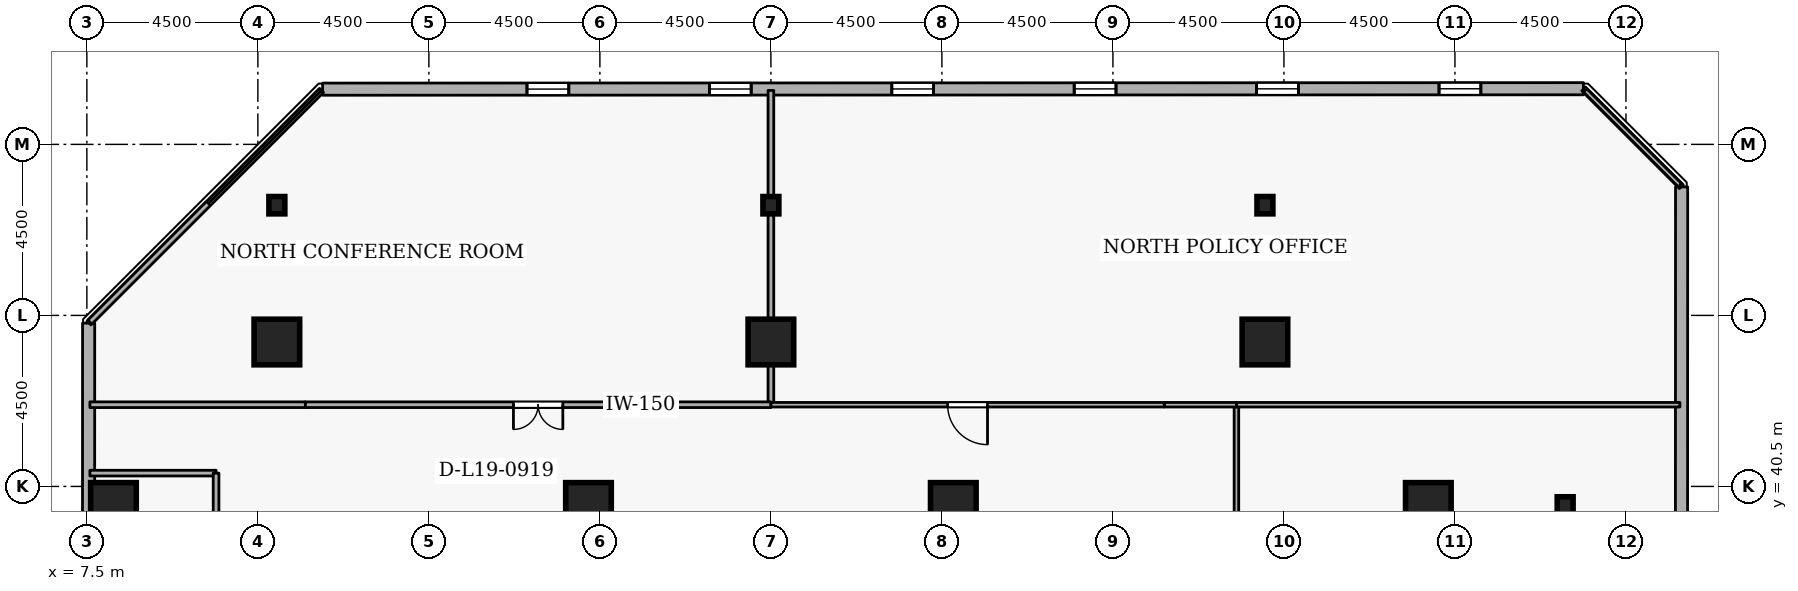
"""IFC4 building model, lengths in metres.
Left out: names, types, materials, properties, quantities, classifications, styles, units other than length and angle.
Written with IfcOpenShell. Run it as: python <this file> out.ifc"""

import sys

from ifc_helpers import new_model, si_unit, direction, frame, frame_2d, origin, origin_2d, place, context, subcontext, project, spatial, rectangle, i_section, extrude, element, fill, save


model = new_model("IFC4")
c1 = context("Model", 3, precision=1e-05, world=origin(), true_north=direction((0.0, 1.0)))
c2 = subcontext(c1, "Body", "Model", "MODEL_VIEW")
j1 = project(units=[si_unit("LENGTHUNIT", "METRE"), si_unit("PLANEANGLEUNIT", "RADIAN")], contexts=[c1])
p1 = place(None, origin())
s1 = spatial("IfcSite", under=j1, at=p1, CompositionType="ELEMENT")
p2 = place(p1, origin())
s2 = spatial("IfcBuilding", under=s1, at=p2, CompositionType="ELEMENT")
p3 = place(p2, frame((0.0, 0.0, 75.9)))
s3 = spatial("IfcBuildingStorey", under=s2, at=p3, CompositionType="ELEMENT", Elevation=75.9)
for number, where, z_axis, x_axis in (
    (1, (42.8, 40.0, 0.0), (0.0, 0.0, 1.0), (1.0, 0.0, 0.0)),
    (2, (12.5, 44.3, 0.0), (0.0, 0.0, 1.0), (1.0, 0.0, 0.0)),
    (3, (25.5, 44.3, 0.0), (0.0, 0.0, 1.0), (1.0, 0.0, 0.0)),
    (4, (38.5, 44.3, 0.0), (0.0, 0.0, 1.0), (1.0, 0.0, 0.0)),
    (5, (8.2, 40.0, 0.0), (0.0, 0.0, 1.0), (1.0, 0.0, 0.0)),
    (6, (20.7, 40.0, 0.0), (0.0, 0.0, 1.0), (1.0, 0.0, 0.0)),
    (7, (30.3, 40.0, 0.0), (0.0, 0.0, 1.0), (1.0, 0.0, 0.0)),
):
    element("IfcColumn", number, at=place(p3, frame(where, z_axis=z_axis, x_axis=x_axis)), inside=s3, PredefinedType="COLUMN", context=c2, shape_type="SweptSolid", body=[
        extrude(rectangle(XDim=1.2, YDim=1.2, at=origin_2d()), origin(), (0.0, 0.0, 1.0), 4.2),
    ])
for number, where, z_axis, x_axis in (
    (8, (46.4, 40.0, 0.0), (0.0, 0.0, 1.0), (1.0, 0.0, 0.0)),
    (9, (12.5, 47.9, 0.0), (0.0, 0.0, 1.0), (1.0, 0.0, 0.0)),
    (10, (25.5, 47.9, 0.0), (0.0, 0.0, 1.0), (1.0, 0.0, 0.0)),
    (11, (38.5, 47.9, 0.0), (0.0, 0.0, 1.0), (1.0, 0.0, 0.0)),
):
    element("IfcColumn", number, at=place(p3, frame(where, z_axis=z_axis, x_axis=x_axis)), inside=s3, PredefinedType="COLUMN", context=c2, shape_type="SweptSolid", body=[
        extrude(i_section(OverallWidth=0.418, OverallDepth=0.456, WebThickness=0.042, FlangeThickness=0.067, FilletRadius=0.015, at=origin_2d()), origin(), (0.0, 0.0, 1.0), 4.2),
    ])
p4 = place(p3, frame((49.453, 15.204, 0.0), z_axis=(0.0, 0.0, 1.0), x_axis=(0.000353213856, 0.99999993762, 0.0)))
e12 = element("IfcWall", 12, at=p4, inside=s3, PredefinedType="STANDARD", context=c2, shape_type="SweptSolid", body=[
    extrude(rectangle(XDim=33.177, YDim=0.32, at=frame_2d((16.589, 0.0))), origin(), (0.0, 0.0, 1.0), 3.3),
])
p5 = place(p4, frame((2.7, 0.0, 0.72)))
e13 = element("IfcOpeningElement", 13, at=p5, cuts=e12, PredefinedType="OPENING", context=c2, shape_type="SweptSolid", body=[
    extrude(rectangle(XDim=1.1, YDim=1.8, at=frame_2d((0.55, 0.9))), frame((0.0, 0.17, 0.0), z_axis=(0.0, -1.0, 0.0), x_axis=(1.0, 0.0, 0.0)), (0.0, 0.0, 1.0), 0.34),
])
p6 = place(p4, frame((7.5, 0.0, 0.72)))
e14 = element("IfcOpeningElement", 14, at=p6, cuts=e12, PredefinedType="OPENING", context=c2, shape_type="SweptSolid", body=[
    extrude(rectangle(XDim=1.1, YDim=1.8, at=frame_2d((0.55, 0.9))), frame((0.0, 0.17, 0.0), z_axis=(0.0, -1.0, 0.0), x_axis=(1.0, 0.0, 0.0)), (0.0, 0.0, 1.0), 0.34),
])
p7 = place(p4, frame((12.3, 0.0, 0.72)))
e15 = element("IfcOpeningElement", 15, at=p7, cuts=e12, PredefinedType="OPENING", context=c2, shape_type="SweptSolid", body=[
    extrude(rectangle(XDim=1.1, YDim=1.8, at=frame_2d((0.55, 0.9))), frame((0.0, 0.17, 0.0), z_axis=(0.0, -1.0, 0.0), x_axis=(1.0, 0.0, 0.0)), (0.0, 0.0, 1.0), 0.34),
])
p8 = place(p4, frame((17.1, 0.0, 0.72)))
e16 = element("IfcOpeningElement", 16, at=p8, cuts=e12, PredefinedType="OPENING", context=c2, shape_type="SweptSolid", body=[
    extrude(rectangle(XDim=1.1, YDim=1.8, at=frame_2d((0.55, 0.9))), frame((0.0, 0.17, 0.0), z_axis=(0.0, -1.0, 0.0), x_axis=(1.0, 0.0, 0.0)), (0.0, 0.0, 1.0), 0.34),
])
p9 = place(p4, frame((21.9, 0.0, 0.72)))
e17 = element("IfcOpeningElement", 17, at=p9, cuts=e12, PredefinedType="OPENING", context=c2, shape_type="SweptSolid", body=[
    extrude(rectangle(XDim=1.1, YDim=1.8, at=frame_2d((0.55, 0.9))), frame((0.0, 0.17, 0.0), z_axis=(0.0, -1.0, 0.0), x_axis=(1.0, 0.0, 0.0)), (0.0, 0.0, 1.0), 0.34),
])
p10 = place(p3, frame((46.881, 50.965, 0.0), z_axis=(0.0, 0.0, 1.0), x_axis=(-0.99999993762, -0.000353213856, 0.0)))
e18 = element("IfcWall", 18, at=p10, inside=s3, PredefinedType="STANDARD", context=c2, shape_type="SweptSolid", body=[
    extrude(rectangle(XDim=33.177, YDim=0.32, at=frame_2d((16.589, 0.0))), origin(), (0.0, 0.0, 1.0), 3.3),
])
p11 = place(p10, frame((2.7, 0.0, 0.72)))
e19 = element("IfcOpeningElement", 19, at=p11, cuts=e18, PredefinedType="OPENING", context=c2, shape_type="SweptSolid", body=[
    extrude(rectangle(XDim=1.1, YDim=1.8, at=frame_2d((0.55, 0.9))), frame((0.0, 0.17, 0.0), z_axis=(0.0, -1.0, 0.0), x_axis=(1.0, 0.0, 0.0)), (0.0, 0.0, 1.0), 0.34),
])
p12 = place(p10, frame((7.5, 0.0, 0.72)))
e20 = element("IfcOpeningElement", 20, at=p12, cuts=e18, PredefinedType="OPENING", context=c2, shape_type="SweptSolid", body=[
    extrude(rectangle(XDim=1.1, YDim=1.8, at=frame_2d((0.55, 0.9))), frame((0.0, 0.17, 0.0), z_axis=(0.0, -1.0, 0.0), x_axis=(1.0, 0.0, 0.0)), (0.0, 0.0, 1.0), 0.34),
])
p13 = place(p10, frame((12.3, 0.0, 0.72)))
e21 = element("IfcOpeningElement", 21, at=p13, cuts=e18, PredefinedType="OPENING", context=c2, shape_type="SweptSolid", body=[
    extrude(rectangle(XDim=1.1, YDim=1.8, at=frame_2d((0.55, 0.9))), frame((0.0, 0.17, 0.0), z_axis=(0.0, -1.0, 0.0), x_axis=(1.0, 0.0, 0.0)), (0.0, 0.0, 1.0), 0.34),
])
p14 = place(p10, frame((17.1, 0.0, 0.72)))
e22 = element("IfcOpeningElement", 22, at=p14, cuts=e18, PredefinedType="OPENING", context=c2, shape_type="SweptSolid", body=[
    extrude(rectangle(XDim=1.1, YDim=1.8, at=frame_2d((0.55, 0.9))), frame((0.0, 0.17, 0.0), z_axis=(0.0, -1.0, 0.0), x_axis=(1.0, 0.0, 0.0)), (0.0, 0.0, 1.0), 0.34),
])
p15 = place(p10, frame((21.9, 0.0, 0.72)))
e23 = element("IfcOpeningElement", 23, at=p15, cuts=e18, PredefinedType="OPENING", context=c2, shape_type="SweptSolid", body=[
    extrude(rectangle(XDim=1.1, YDim=1.8, at=frame_2d((0.55, 0.9))), frame((0.0, 0.17, 0.0), z_axis=(0.0, -1.0, 0.0), x_axis=(1.0, 0.0, 0.0)), (0.0, 0.0, 1.0), 0.34),
])
p16 = place(p10, frame((26.7, 0.0, 0.72)))
e24 = element("IfcOpeningElement", 24, at=p16, cuts=e18, PredefinedType="OPENING", context=c2, shape_type="SweptSolid", body=[
    extrude(rectangle(XDim=1.1, YDim=1.8, at=frame_2d((0.55, 0.9))), frame((0.0, 0.17, 0.0), z_axis=(0.0, -1.0, 0.0), x_axis=(1.0, 0.0, 0.0)), (0.0, 0.0, 1.0), 0.34),
])
p17 = place(p3, frame((7.547, 44.796, 0.0), z_axis=(0.0, 0.0, 1.0), x_axis=(-0.000353213856, -0.99999993762, 0.0)))
e25 = element("IfcWall", 25, at=p17, inside=s3, PredefinedType="STANDARD", context=c2, shape_type="SweptSolid", body=[
    extrude(rectangle(XDim=33.177, YDim=0.32, at=frame_2d((16.589, 0.0))), origin(), (0.0, 0.0, 1.0), 3.3),
])
p18 = place(p3, frame((7.58, 40.85, 0.0), z_axis=(0.0, 0.0, 1.0), x_axis=(1.0, 0.0, 0.0)))
e26 = element("IfcWall", 26, at=p18, inside=s3, PredefinedType="PARTITIONING", context=c2, shape_type="SweptSolid", body=[
    extrude(rectangle(XDim=3.32, YDim=0.15, at=frame_2d((1.66, 0.0))), origin(), (0.0, 0.0, 1.0), 3.94),
])
p19 = place(p3, frame((10.9, 40.85, 0.0), z_axis=(0.0, 0.0, 1.0), x_axis=(0.0, -1.0, 0.0)))
e27 = element("IfcWall", 27, at=p19, inside=s3, PredefinedType="PARTITIONING", context=c2, shape_type="SweptSolid", body=[
    extrude(rectangle(XDim=4.912, YDim=0.15, at=frame_2d((2.456, 0.0))), origin(), (0.0, 0.0, 1.0), 3.94),
])
p20 = place(p3, frame((37.75, 33.3, 0.0), z_axis=(0.0, 0.0, 1.0), x_axis=(0.0, 1.0, 0.0)))
e28 = element("IfcWall", 28, at=p20, inside=s3, PredefinedType="PARTITIONING", context=c2, shape_type="SweptSolid", body=[
    extrude(rectangle(XDim=9.35, YDim=0.12, at=frame_2d((4.675, 0.0))), origin(), (0.0, 0.0, 1.0), 3.94),
])
p21 = place(p20, frame((4.15, 0.0, 0.0)))
e29 = element("IfcOpeningElement", 29, at=p21, cuts=e28, PredefinedType="OPENING", context=c2, shape_type="SweptSolid", body=[
    extrude(rectangle(XDim=1.05, YDim=2.1, at=frame_2d((0.525, 1.05))), frame((0.0, 0.07, 0.0), z_axis=(0.0, -1.0, 0.0), x_axis=(1.0, 0.0, 0.0)), (0.0, 0.0, 1.0), 0.14),
])
p22 = place(p3, frame((37.75, 42.65, 0.0), z_axis=(0.0, 0.0, 1.0), x_axis=(1.0, 0.0, 0.0)))
e30 = element("IfcWall", 30, at=p22, inside=s3, PredefinedType="PARTITIONING", context=c2, shape_type="SweptSolid", body=[
    extrude(rectangle(XDim=11.67, YDim=0.12, at=frame_2d((5.835, 0.0))), origin(), (0.0, 0.0, 1.0), 3.94),
])
p23 = place(p3, frame((13.25, 42.65, 0.0), z_axis=(0.0, 0.0, 1.0), x_axis=(-1.0, 0.0, 0.0)))
e31 = element("IfcWall", 31, at=p23, inside=s3, PredefinedType="PARTITIONING", context=c2, shape_type="SweptSolid", body=[
    extrude(rectangle(XDim=5.67, YDim=0.15, at=frame_2d((2.835, 0.0))), origin(), (0.0, 0.0, 1.0), 3.94),
])
p24 = place(p3, frame((7.58, 44.825, 0.0), z_axis=(0.0, 0.0, 1.0), x_axis=(0.707106781187, 0.707106781187, 0.0)))
e32 = element("IfcWall", 32, at=p24, inside=s3, PredefinedType="PARTITIONING", context=c2, shape_type="SweptSolid", body=[
    extrude(rectangle(XDim=8.619, YDim=0.15, at=frame_2d((4.31, 0.0))), origin(), (0.0, 0.0, 1.0), 3.94),
])
p25 = place(p3, frame((25.5, 50.92, 0.0), z_axis=(0.0, 0.0, 1.0), x_axis=(0.0, -1.0, 0.0)))
e33 = element("IfcWall", 33, at=p25, inside=s3, PredefinedType="PARTITIONING", context=c2, shape_type="SweptSolid", body=[
    extrude(rectangle(XDim=8.27, YDim=0.15, at=frame_2d((4.135, 0.0))), origin(), (0.0, 0.0, 1.0), 3.482),
])
p26 = place(p3, frame((25.5, 42.65, 0.0), z_axis=(0.0, 0.0, 1.0), x_axis=(-1.0, 0.0, 0.0)))
e34 = element("IfcWall", 34, at=p26, inside=s3, PredefinedType="PARTITIONING", context=c2, shape_type="SweptSolid", body=[
    extrude(rectangle(XDim=12.25, YDim=0.15, at=frame_2d((6.125, 0.0))), origin(), (0.0, 0.0, 1.0), 3.94),
])
p27 = place(p26, frame((5.475, 0.0, 0.0)))
e35 = element("IfcOpeningElement", 35, at=p27, cuts=e34, PredefinedType="OPENING", context=c2, shape_type="SweptSolid", body=[
    extrude(rectangle(XDim=1.3, YDim=2.12, at=frame_2d((0.65, 1.06))), frame((0.0, 0.085, 0.0), z_axis=(0.0, -1.0, 0.0), x_axis=(1.0, 0.0, 0.0)), (0.0, 0.0, 1.0), 0.17),
])
p28 = place(p3, frame((37.75, 42.65, 0.0), z_axis=(0.0, 0.0, 1.0), x_axis=(-1.0, 0.0, 0.0)))
e36 = element("IfcWall", 36, at=p28, inside=s3, PredefinedType="PARTITIONING", context=c2, shape_type="SweptSolid", body=[
    extrude(rectangle(XDim=1.9, YDim=0.12, at=frame_2d((0.95, 0.0))), origin(), (0.0, 0.0, 1.0), 3.495),
])
p29 = place(p3, frame((35.85, 42.65, 0.0), z_axis=(0.0, 0.0, 1.0), x_axis=(-1.0, 0.0, 0.0)))
e37 = element("IfcWall", 37, at=p29, inside=s3, PredefinedType="PARTITIONING", context=c2, shape_type="SweptSolid", body=[
    extrude(rectangle(XDim=10.35, YDim=0.12, at=frame_2d((5.175, 0.0))), origin(), (0.0, 0.0, 1.0), 3.495),
])
p30 = place(p29, frame((4.65, 0.0, 0.0)))
e38 = element("IfcOpeningElement", 38, at=p30, cuts=e37, PredefinedType="OPENING", context=c2, shape_type="SweptSolid", body=[
    extrude(rectangle(XDim=1.05, YDim=2.1, at=frame_2d((0.525, 1.05))), frame((0.0, 0.07, 0.0), z_axis=(0.0, -1.0, 0.0), x_axis=(1.0, 0.0, 0.0)), (0.0, 0.0, 1.0), 0.14),
])
p31 = place(p3, frame((46.925, 50.92, 0.0), z_axis=(0.0, 0.0, 1.0), x_axis=(0.707106781187, -0.707106781187, 0.0)))
e39 = element("IfcWall", 39, at=p31, inside=s3, PredefinedType="PARTITIONING", context=c2, shape_type="SweptSolid", body=[
    extrude(rectangle(XDim=3.528, YDim=0.12, at=frame_2d((1.764, 0.0))), origin(), (0.0, 0.0, 1.0), 3.94),
])
p32 = place(p11, origin())
e40 = element("IfcWindow", 40, at=p32, inside=s3, PartitioningType="SINGLE_PANEL", PredefinedType="WINDOW", context=c2, shape_type="SweptSolid", body=[
    extrude(rectangle(XDim=1.1, YDim=1.8, at=frame_2d((0.55, 0.9))), frame((0.0, 0.03, 0.0), z_axis=(0.0, -1.0, 0.0), x_axis=(1.0, 0.0, 0.0)), (0.0, 0.0, 1.0), 0.06),
])
fill(e19, e40)
p33 = place(p12, origin())
e41 = element("IfcWindow", 41, at=p33, inside=s3, PartitioningType="SINGLE_PANEL", PredefinedType="WINDOW", context=c2, shape_type="SweptSolid", body=[
    extrude(rectangle(XDim=1.1, YDim=1.8, at=frame_2d((0.55, 0.9))), frame((0.0, 0.03, 0.0), z_axis=(0.0, -1.0, 0.0), x_axis=(1.0, 0.0, 0.0)), (0.0, 0.0, 1.0), 0.06),
])
fill(e20, e41)
p34 = place(p13, origin())
e42 = element("IfcWindow", 42, at=p34, inside=s3, PartitioningType="SINGLE_PANEL", PredefinedType="WINDOW", context=c2, shape_type="SweptSolid", body=[
    extrude(rectangle(XDim=1.1, YDim=1.8, at=frame_2d((0.55, 0.9))), frame((0.0, 0.03, 0.0), z_axis=(0.0, -1.0, 0.0), x_axis=(1.0, 0.0, 0.0)), (0.0, 0.0, 1.0), 0.06),
])
fill(e21, e42)
p35 = place(p14, origin())
e43 = element("IfcWindow", 43, at=p35, inside=s3, PartitioningType="SINGLE_PANEL", PredefinedType="WINDOW", context=c2, shape_type="SweptSolid", body=[
    extrude(rectangle(XDim=1.1, YDim=1.8, at=frame_2d((0.55, 0.9))), frame((0.0, 0.03, 0.0), z_axis=(0.0, -1.0, 0.0), x_axis=(1.0, 0.0, 0.0)), (0.0, 0.0, 1.0), 0.06),
])
fill(e22, e43)
p36 = place(p15, origin())
e44 = element("IfcWindow", 44, at=p36, inside=s3, PartitioningType="SINGLE_PANEL", PredefinedType="WINDOW", context=c2, shape_type="SweptSolid", body=[
    extrude(rectangle(XDim=1.1, YDim=1.8, at=frame_2d((0.55, 0.9))), frame((0.0, 0.03, 0.0), z_axis=(0.0, -1.0, 0.0), x_axis=(1.0, 0.0, 0.0)), (0.0, 0.0, 1.0), 0.06),
])
fill(e23, e44)
p37 = place(p16, origin())
e45 = element("IfcWindow", 45, at=p37, inside=s3, PartitioningType="SINGLE_PANEL", PredefinedType="WINDOW", context=c2, shape_type="SweptSolid", body=[
    extrude(rectangle(XDim=1.1, YDim=1.8, at=frame_2d((0.55, 0.9))), frame((0.0, 0.03, 0.0), z_axis=(0.0, -1.0, 0.0), x_axis=(1.0, 0.0, 0.0)), (0.0, 0.0, 1.0), 0.06),
])
fill(e24, e45)
p38 = place(p27, origin())
e46 = element("IfcDoor", 46, at=p38, inside=s3, OperationType="DOUBLE_DOOR_SINGLE_SWING", PredefinedType="DOOR", context=c2, shape_type="SweptSolid", body=[
    extrude(rectangle(XDim=1.3, YDim=2.12, at=frame_2d((0.65, 1.06))), frame((0.0, 0.025, 0.0), z_axis=(0.0, -1.0, 0.0), x_axis=(1.0, 0.0, 0.0)), (0.0, 0.0, 1.0), 0.05),
])
fill(e35, e46)
p39 = place(p30, origin())
e47 = element("IfcDoor", 47, at=p39, inside=s3, OperationType="SINGLE_SWING_LEFT", PredefinedType="DOOR", context=c2, shape_type="SweptSolid", body=[
    extrude(rectangle(XDim=1.05, YDim=2.1, at=frame_2d((0.525, 1.05))), frame((0.0, 0.025, 0.0), z_axis=(0.0, -1.0, 0.0), x_axis=(1.0, 0.0, 0.0)), (0.0, 0.0, 1.0), 0.05),
])
fill(e38, e47)
save(model, sys.argv[1])
